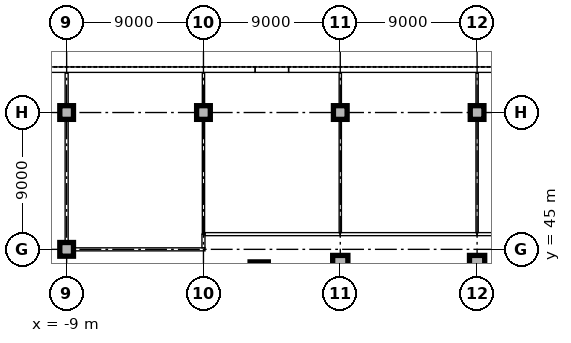
"""IFC4 building model, lengths in metres.
Left out: names, types, materials, properties, quantities, classifications, styles, units other than length and angle.
Written with IfcOpenShell. Run it as: python <this file> out.ifc"""

import sys

from ifc_helpers import new_model, si_unit, direction, frame, frame_2d, origin, origin_2d, place, context, subcontext, project, spatial, rectangle, extrude, element, fill, save


model = new_model("IFC4")
c1 = context("Model", 3, precision=1e-05, world=origin(), true_north=direction((0.0, 1.0)))
c2 = subcontext(c1, "Body", "Model", "MODEL_VIEW")
j1 = project(units=[si_unit("LENGTHUNIT", "METRE"), si_unit("PLANEANGLEUNIT", "RADIAN")], contexts=[c1])
p1 = place(None, origin())
s1 = spatial("IfcSite", under=j1, at=p1, CompositionType="ELEMENT")
p2 = place(p1, origin())
s2 = spatial("IfcBuilding", under=s1, at=p2, CompositionType="ELEMENT")
p3 = place(p2, origin())
s3 = spatial("IfcBuildingStorey", under=s2, at=p3, CompositionType="ELEMENT", Elevation=0.0)
p4 = place(p3, frame((3.667, 43.574, 0.0), z_axis=(0.0, 0.0, 1.0), x_axis=(1.0, 0.0, 0.0)))
e1 = element("IfcColumn", 1, at=p4, inside=s3, PredefinedType="COLUMN", context=c2, shape_type="SweptSolid", body=[
    extrude(rectangle(XDim=1.2, YDim=1.2, at=origin_2d()), origin(), (0.0, 0.0, 1.0), 5.7),
])
for number, where, z_axis, x_axis in (
    (2, (9.0, 44.1, 0.0), (0.0, 0.0, 1.0), (1.0, 0.0, 0.0)),
    (3, (18.0, 44.1, 0.0), (0.0, 0.0, 1.0), (1.0, 0.0, 0.0)),
):
    element("IfcColumn", number, at=place(p3, frame(where, z_axis=z_axis, x_axis=x_axis)), inside=s3, PredefinedType="COLUMN", context=c2, shape_type="SweptSolid", body=[
        extrude(rectangle(XDim=1.0, YDim=1.0, at=origin_2d()), origin(), (0.0, 0.0, 1.0), 5.7),
    ])
for number, where, z_axis, x_axis in (
    (4, (-9.0, 45.0, 0.0), (0.0, 0.0, 1.0), (1.0, 0.0, 0.0)),
    (5, (-9.0, 54.0, 0.0), (0.0, 0.0, 1.0), (1.0, 0.0, 0.0)),
    (6, (0.0, 54.0, 0.0), (0.0, 0.0, 1.0), (1.0, 0.0, 0.0)),
    (7, (9.0, 54.0, 0.0), (0.0, 0.0, 1.0), (1.0, 0.0, 0.0)),
    (8, (18.0, 54.0, 0.0), (0.0, 0.0, 1.0), (1.0, 0.0, 0.0)),
):
    element("IfcColumn", number, at=place(p3, frame(where, z_axis=z_axis, x_axis=x_axis)), inside=s3, PredefinedType="COLUMN", context=c2, shape_type="SweptSolid", body=[
        extrude(rectangle(XDim=0.9, YDim=0.9, at=origin_2d()), origin(), (0.0, 0.0, 1.0), 5.7),
    ])
p5 = place(p3, frame((63.0, 56.82, 0.0), z_axis=(0.0, 0.0, 1.0), x_axis=(-1.0, 0.0, 0.0)))
e9 = element("IfcWall", 9, at=p5, inside=s3, PredefinedType="STANDARD", context=c2, shape_type="SweptSolid", body=[
    extrude(rectangle(XDim=57.4, YDim=0.36, at=frame_2d((28.7, 0.0))), origin(), (0.0, 0.0, 1.0), 5.7),
])
p6 = place(p5, frame((32.55, 0.0, 0.0)))
e10 = element("IfcOpeningElement", 10, at=p6, cuts=e9, PredefinedType="OPENING", context=c2, shape_type="SweptSolid", body=[
    extrude(rectangle(XDim=2.4, YDim=2.4, at=frame_2d((1.2, 1.2))), frame((0.0, 0.19, 0.0), z_axis=(0.0, -1.0, 0.0), x_axis=(1.0, 0.0, 0.0)), (0.0, 0.0, 1.0), 0.38),
])
p7 = place(p5, frame((48.3, 0.0, 0.0)))
e11 = element("IfcOpeningElement", 11, at=p7, cuts=e9, PredefinedType="OPENING", context=c2, shape_type="SweptSolid", body=[
    extrude(rectangle(XDim=2.4, YDim=2.2, at=frame_2d((1.2, 1.1))), frame((0.0, 0.19, 0.0), z_axis=(0.0, -1.0, 0.0), x_axis=(1.0, 0.0, 0.0)), (0.0, 0.0, 1.0), 0.38),
])
p8 = place(p5, frame((39.3, 0.0, 0.0)))
e12 = element("IfcOpeningElement", 12, at=p8, cuts=e9, PredefinedType="OPENING", context=c2, shape_type="SweptSolid", body=[
    extrude(rectangle(XDim=2.4, YDim=2.2, at=frame_2d((1.2, 1.1))), frame((0.0, 0.19, 0.0), z_axis=(0.0, -1.0, 0.0), x_axis=(1.0, 0.0, 0.0)), (0.0, 0.0, 1.0), 0.38),
])
p9 = place(p5, frame((12.3, 0.0, 0.0)))
e13 = element("IfcOpeningElement", 13, at=p9, cuts=e9, PredefinedType="OPENING", context=c2, shape_type="SweptSolid", body=[
    extrude(rectangle(XDim=2.4, YDim=2.2, at=frame_2d((1.2, 1.1))), frame((0.0, 0.19, 0.0), z_axis=(0.0, -1.0, 0.0), x_axis=(1.0, 0.0, 0.0)), (0.0, 0.0, 1.0), 0.38),
])
p10 = place(p5, frame((21.6, 0.0, 0.0)))
e14 = element("IfcOpeningElement", 14, at=p10, cuts=e9, PredefinedType="OPENING", context=c2, shape_type="SweptSolid", body=[
    extrude(rectangle(XDim=1.8, YDim=2.2, at=frame_2d((0.9, 1.1))), frame((0.0, 0.19, 0.0), z_axis=(0.0, -1.0, 0.0), x_axis=(1.0, 0.0, 0.0)), (0.0, 0.0, 1.0), 0.38),
])
p11 = place(p5, frame((2.1, 0.0, 0.0)))
e15 = element("IfcOpeningElement", 15, at=p11, cuts=e9, PredefinedType="OPENING", context=c2, shape_type="SweptSolid", body=[
    extrude(rectangle(XDim=1.8, YDim=2.2, at=frame_2d((0.9, 1.1))), frame((0.0, 0.19, 0.0), z_axis=(0.0, -1.0, 0.0), x_axis=(1.0, 0.0, 0.0)), (0.0, 0.0, 1.0), 0.38),
])
p12 = place(p5, frame((7.35, 0.0, 0.6)))
e16 = element("IfcOpeningElement", 16, at=p12, cuts=e9, PredefinedType="OPENING", context=c2, shape_type="SweptSolid", body=[
    extrude(rectangle(XDim=3.3, YDim=3.0, at=frame_2d((1.65, 1.5))), frame((0.0, 0.19, 0.0), z_axis=(0.0, -1.0, 0.0), x_axis=(1.0, 0.0, 0.0)), (0.0, 0.0, 1.0), 0.38),
])
p13 = place(p5, frame((16.35, 0.0, 0.6)))
e17 = element("IfcOpeningElement", 17, at=p13, cuts=e9, PredefinedType="OPENING", context=c2, shape_type="SweptSolid", body=[
    extrude(rectangle(XDim=3.3, YDim=3.0, at=frame_2d((1.65, 1.5))), frame((0.0, 0.19, 0.0), z_axis=(0.0, -1.0, 0.0), x_axis=(1.0, 0.0, 0.0)), (0.0, 0.0, 1.0), 0.38),
])
p14 = place(p5, frame((25.35, 0.0, 0.6)))
e18 = element("IfcOpeningElement", 18, at=p14, cuts=e9, PredefinedType="OPENING", context=c2, shape_type="SweptSolid", body=[
    extrude(rectangle(XDim=3.3, YDim=3.0, at=frame_2d((1.65, 1.5))), frame((0.0, 0.19, 0.0), z_axis=(0.0, -1.0, 0.0), x_axis=(1.0, 0.0, 0.0)), (0.0, 0.0, 1.0), 0.38),
])
p15 = place(p5, frame((43.35, 0.0, 0.6)))
e19 = element("IfcOpeningElement", 19, at=p15, cuts=e9, PredefinedType="OPENING", context=c2, shape_type="SweptSolid", body=[
    extrude(rectangle(XDim=3.3, YDim=3.0, at=frame_2d((1.65, 1.5))), frame((0.0, 0.19, 0.0), z_axis=(0.0, -1.0, 0.0), x_axis=(1.0, 0.0, 0.0)), (0.0, 0.0, 1.0), 0.38),
])
p16 = place(p5, frame((52.35, 0.0, 0.6)))
e20 = element("IfcOpeningElement", 20, at=p16, cuts=e9, PredefinedType="OPENING", context=c2, shape_type="SweptSolid", body=[
    extrude(rectangle(XDim=3.3, YDim=3.0, at=frame_2d((1.65, 1.5))), frame((0.0, 0.19, 0.0), z_axis=(0.0, -1.0, 0.0), x_axis=(1.0, 0.0, 0.0)), (0.0, 0.0, 1.0), 0.38),
])
p17 = place(p3, frame((5.6, 56.82, 0.0), z_axis=(0.0, 0.0, 1.0), x_axis=(-1.0, 0.0, 0.0)))
e21 = element("IfcWall", 21, at=p17, inside=s3, PredefinedType="STANDARD", context=c2, shape_type="SweptSolid", body=[
    extrude(rectangle(XDim=2.2, YDim=0.36, at=frame_2d((1.1, 0.0))), origin(), (0.0, 0.0, 1.0), 5.7),
])
p18 = place(p17, frame((0.5, 0.0, 0.0)))
e22 = element("IfcOpeningElement", 22, at=p18, cuts=e21, PredefinedType="OPENING", context=c2, shape_type="SweptSolid", body=[
    extrude(rectangle(XDim=1.2, YDim=2.2, at=frame_2d((0.6, 1.1))), frame((0.0, 0.19, 0.0), z_axis=(0.0, -1.0, 0.0), x_axis=(1.0, 0.0, 0.0)), (0.0, 0.0, 1.0), 0.38),
])
p19 = place(p3, frame((3.4, 56.82, 0.0), z_axis=(0.0, 0.0, 1.0), x_axis=(-1.0, 0.0, 0.0)))
e23 = element("IfcWall", 23, at=p19, inside=s3, PredefinedType="STANDARD", context=c2, shape_type="SweptSolid", body=[
    extrude(rectangle(XDim=84.4, YDim=0.36, at=frame_2d((42.2, 0.0))), origin(), (0.0, 0.0, 1.0), 5.7),
])
p20 = place(p19, frame((15.7, 0.0, 0.0)))
e24 = element("IfcOpeningElement", 24, at=p20, cuts=e23, PredefinedType="OPENING", context=c2, shape_type="SweptSolid", body=[
    extrude(rectangle(XDim=2.4, YDim=2.4, at=frame_2d((1.2, 1.2))), frame((0.0, 0.19, 0.0), z_axis=(0.0, -1.0, 0.0), x_axis=(1.0, 0.0, 0.0)), (0.0, 0.0, 1.0), 0.38),
])
p21 = place(p19, frame((76.6, 0.0, 0.0)))
e25 = element("IfcOpeningElement", 25, at=p21, cuts=e23, PredefinedType="OPENING", context=c2, shape_type="SweptSolid", body=[
    extrude(rectangle(XDim=6.6, YDim=4.2, at=frame_2d((3.3, 2.1))), frame((0.0, 0.19, 0.0), z_axis=(0.0, -1.0, 0.0), x_axis=(1.0, 0.0, 0.0)), (0.0, 0.0, 1.0), 0.38),
])
p22 = place(p19, frame((59.65, 0.0, 0.0)))
e26 = element("IfcOpeningElement", 26, at=p22, cuts=e23, PredefinedType="OPENING", context=c2, shape_type="SweptSolid", body=[
    extrude(rectangle(XDim=4.5, YDim=4.2, at=frame_2d((2.25, 2.1))), frame((0.0, 0.19, 0.0), z_axis=(0.0, -1.0, 0.0), x_axis=(1.0, 0.0, 0.0)), (0.0, 0.0, 1.0), 0.38),
])
p23 = place(p19, frame((58.3, 0.0, 0.0)))
e27 = element("IfcOpeningElement", 27, at=p23, cuts=e23, PredefinedType="OPENING", context=c2, shape_type="SweptSolid", body=[
    extrude(rectangle(XDim=1.2, YDim=2.2, at=frame_2d((0.6, 1.1))), frame((0.0, 0.19, 0.0), z_axis=(0.0, -1.0, 0.0), x_axis=(1.0, 0.0, 0.0)), (0.0, 0.0, 1.0), 0.38),
])
p24 = place(p19, frame((70.0, 0.0, 0.0)))
e28 = element("IfcOpeningElement", 28, at=p24, cuts=e23, PredefinedType="OPENING", context=c2, shape_type="SweptSolid", body=[
    extrude(rectangle(XDim=1.8, YDim=2.2, at=frame_2d((0.9, 1.1))), frame((0.0, 0.19, 0.0), z_axis=(0.0, -1.0, 0.0), x_axis=(1.0, 0.0, 0.0)), (0.0, 0.0, 1.0), 0.38),
])
p25 = place(p19, frame((52.0, 0.0, 0.0)))
e29 = element("IfcOpeningElement", 29, at=p25, cuts=e23, PredefinedType="OPENING", context=c2, shape_type="SweptSolid", body=[
    extrude(rectangle(XDim=1.8, YDim=2.2, at=frame_2d((0.9, 1.1))), frame((0.0, 0.19, 0.0), z_axis=(0.0, -1.0, 0.0), x_axis=(1.0, 0.0, 0.0)), (0.0, 0.0, 1.0), 0.38),
])
p26 = place(p19, frame((1.75, 0.0, 0.6)))
e30 = element("IfcOpeningElement", 30, at=p26, cuts=e23, PredefinedType="OPENING", context=c2, shape_type="SweptSolid", body=[
    extrude(rectangle(XDim=3.3, YDim=3.0, at=frame_2d((1.65, 1.5))), frame((0.0, 0.19, 0.0), z_axis=(0.0, -1.0, 0.0), x_axis=(1.0, 0.0, 0.0)), (0.0, 0.0, 1.0), 0.38),
])
p27 = place(p19, frame((6.25, 0.0, 0.6)))
e31 = element("IfcOpeningElement", 31, at=p27, cuts=e23, PredefinedType="OPENING", context=c2, shape_type="SweptSolid", body=[
    extrude(rectangle(XDim=3.3, YDim=3.0, at=frame_2d((1.65, 1.5))), frame((0.0, 0.19, 0.0), z_axis=(0.0, -1.0, 0.0), x_axis=(1.0, 0.0, 0.0)), (0.0, 0.0, 1.0), 0.38),
])
p28 = place(p19, frame((10.75, 0.0, 0.6)))
e32 = element("IfcOpeningElement", 32, at=p28, cuts=e23, PredefinedType="OPENING", context=c2, shape_type="SweptSolid", body=[
    extrude(rectangle(XDim=3.3, YDim=3.0, at=frame_2d((1.65, 1.5))), frame((0.0, 0.19, 0.0), z_axis=(0.0, -1.0, 0.0), x_axis=(1.0, 0.0, 0.0)), (0.0, 0.0, 1.0), 0.38),
])
p29 = place(p19, frame((19.75, 0.0, 0.6)))
e33 = element("IfcOpeningElement", 33, at=p29, cuts=e23, PredefinedType="OPENING", context=c2, shape_type="SweptSolid", body=[
    extrude(rectangle(XDim=3.3, YDim=3.0, at=frame_2d((1.65, 1.5))), frame((0.0, 0.19, 0.0), z_axis=(0.0, -1.0, 0.0), x_axis=(1.0, 0.0, 0.0)), (0.0, 0.0, 1.0), 0.38),
])
p30 = place(p19, frame((24.25, 0.0, 0.6)))
e34 = element("IfcOpeningElement", 34, at=p30, cuts=e23, PredefinedType="OPENING", context=c2, shape_type="SweptSolid", body=[
    extrude(rectangle(XDim=3.3, YDim=3.0, at=frame_2d((1.65, 1.5))), frame((0.0, 0.19, 0.0), z_axis=(0.0, -1.0, 0.0), x_axis=(1.0, 0.0, 0.0)), (0.0, 0.0, 1.0), 0.38),
])
p31 = place(p19, frame((28.75, 0.0, 0.6)))
e35 = element("IfcOpeningElement", 35, at=p31, cuts=e23, PredefinedType="OPENING", context=c2, shape_type="SweptSolid", body=[
    extrude(rectangle(XDim=3.3, YDim=3.0, at=frame_2d((1.65, 1.5))), frame((0.0, 0.19, 0.0), z_axis=(0.0, -1.0, 0.0), x_axis=(1.0, 0.0, 0.0)), (0.0, 0.0, 1.0), 0.38),
])
p32 = place(p19, frame((33.25, 0.0, 0.6)))
e36 = element("IfcOpeningElement", 36, at=p32, cuts=e23, PredefinedType="OPENING", context=c2, shape_type="SweptSolid", body=[
    extrude(rectangle(XDim=3.3, YDim=3.0, at=frame_2d((1.65, 1.5))), frame((0.0, 0.19, 0.0), z_axis=(0.0, -1.0, 0.0), x_axis=(1.0, 0.0, 0.0)), (0.0, 0.0, 1.0), 0.38),
])
p33 = place(p19, frame((37.75, 0.0, 0.6)))
e37 = element("IfcOpeningElement", 37, at=p33, cuts=e23, PredefinedType="OPENING", context=c2, shape_type="SweptSolid", body=[
    extrude(rectangle(XDim=3.3, YDim=3.0, at=frame_2d((1.65, 1.5))), frame((0.0, 0.19, 0.0), z_axis=(0.0, -1.0, 0.0), x_axis=(1.0, 0.0, 0.0)), (0.0, 0.0, 1.0), 0.38),
])
p34 = place(p19, frame((42.25, 0.0, 0.6)))
e38 = element("IfcOpeningElement", 38, at=p34, cuts=e23, PredefinedType="OPENING", context=c2, shape_type="SweptSolid", body=[
    extrude(rectangle(XDim=3.3, YDim=3.0, at=frame_2d((1.65, 1.5))), frame((0.0, 0.19, 0.0), z_axis=(0.0, -1.0, 0.0), x_axis=(1.0, 0.0, 0.0)), (0.0, 0.0, 1.0), 0.38),
])
p35 = place(p19, frame((46.75, 0.0, 0.6)))
e39 = element("IfcOpeningElement", 39, at=p35, cuts=e23, PredefinedType="OPENING", context=c2, shape_type="SweptSolid", body=[
    extrude(rectangle(XDim=3.3, YDim=3.0, at=frame_2d((1.65, 1.5))), frame((0.0, 0.19, 0.0), z_axis=(0.0, -1.0, 0.0), x_axis=(1.0, 0.0, 0.0)), (0.0, 0.0, 1.0), 0.38),
])
p36 = place(p3, frame((-9.0, 45.47, 0.0), z_axis=(0.0, 0.0, 1.0), x_axis=(0.0, 1.0, 0.0)))
e40 = element("IfcWall", 40, at=p36, inside=s3, PredefinedType="PARTITIONING", context=c2, shape_type="SweptSolid", body=[
    extrude(rectangle(XDim=8.06, YDim=0.2, at=frame_2d((4.03, 0.0))), origin(), (0.0, 0.0, 1.0), 5.7),
])
p37 = place(p3, frame((-9.0, 54.47, 0.0), z_axis=(0.0, 0.0, 1.0), x_axis=(0.0, 1.0, 0.0)))
e41 = element("IfcWall", 41, at=p37, inside=s3, PredefinedType="PARTITIONING", context=c2, shape_type="SweptSolid", body=[
    extrude(rectangle(XDim=2.13, YDim=0.2, at=frame_2d((1.065, 0.0))), origin(), (0.0, 0.0, 1.0), 5.7),
])
p38 = place(p37, frame((0.53, 0.0, 0.0)))
e42 = element("IfcOpeningElement", 42, at=p38, cuts=e41, PredefinedType="OPENING", context=c2, shape_type="SweptSolid", body=[
    extrude(rectangle(XDim=1.0, YDim=2.1, at=frame_2d((0.5, 1.05))), frame((0.0, 0.11, 0.0), z_axis=(0.0, -1.0, 0.0), x_axis=(1.0, 0.0, 0.0)), (0.0, 0.0, 1.0), 0.22),
])
p39 = place(p3, frame((-8.53, 45.0, 0.0), z_axis=(0.0, 0.0, 1.0), x_axis=(1.0, 0.0, 0.0)))
e43 = element("IfcWall", 43, at=p39, inside=s3, PredefinedType="PARTITIONING", context=c2, shape_type="SweptSolid", body=[
    extrude(rectangle(XDim=8.63, YDim=0.2, at=frame_2d((4.315, 0.0))), origin(), (0.0, 0.0, 1.0), 5.7),
])
p40 = place(p3, frame((0.0, 45.1, 0.0), z_axis=(0.0, 0.0, 1.0), x_axis=(0.0, 1.0, 0.0)))
e44 = element("IfcWall", 44, at=p40, inside=s3, PredefinedType="PARTITIONING", context=c2, shape_type="SweptSolid", body=[
    extrude(rectangle(XDim=0.9, YDim=0.2, at=frame_2d((0.45, 0.0))), origin(), (0.0, 0.0, 1.0), 5.7),
])
p41 = place(p3, frame((0.0, 46.0, 0.0), z_axis=(0.0, 0.0, 1.0), x_axis=(0.0, 1.0, 0.0)))
e45 = element("IfcWall", 45, at=p41, inside=s3, PredefinedType="PARTITIONING", context=c2, shape_type="SweptSolid", body=[
    extrude(rectangle(XDim=7.53, YDim=0.15, at=frame_2d((3.765, 0.0))), origin(), (0.0, 0.0, 1.0), 5.7),
])
p42 = place(p3, frame((0.0, 54.47, 0.0), z_axis=(0.0, 0.0, 1.0), x_axis=(0.0, 1.0, 0.0)))
e46 = element("IfcWall", 46, at=p42, inside=s3, PredefinedType="PARTITIONING", context=c2, shape_type="SweptSolid", body=[
    extrude(rectangle(XDim=2.13, YDim=0.15, at=frame_2d((1.065, 0.0))), origin(), (0.0, 0.0, 1.0), 5.7),
])
p43 = place(p3, frame((0.1, 46.0, 0.0), z_axis=(0.0, 0.0, 1.0), x_axis=(1.0, 0.0, 0.0)))
e47 = element("IfcWall", 47, at=p43, inside=s3, PredefinedType="PARTITIONING", context=c2, shape_type="SweptSolid", body=[
    extrude(rectangle(XDim=8.9, YDim=0.2, at=frame_2d((4.45, 0.0))), origin(), (0.0, 0.0, 1.0), 5.7),
])
p44 = place(p43, frame((3.9, 0.0, 0.0)))
e48 = element("IfcOpeningElement", 48, at=p44, cuts=e47, PredefinedType="OPENING", context=c2, shape_type="SweptSolid", body=[
    extrude(rectangle(XDim=1.0, YDim=2.1, at=frame_2d((0.5, 1.05))), frame((0.0, 0.11, 0.0), z_axis=(0.0, -1.0, 0.0), x_axis=(1.0, 0.0, 0.0)), (0.0, 0.0, 1.0), 0.22),
])
p45 = place(p3, frame((9.0, 46.0, 0.0), z_axis=(0.0, 0.0, 1.0), x_axis=(1.0, 0.0, 0.0)))
e49 = element("IfcWall", 49, at=p45, inside=s3, PredefinedType="PARTITIONING", context=c2, shape_type="SweptSolid", body=[
    extrude(rectangle(XDim=9.0, YDim=0.2, at=frame_2d((4.5, 0.0))), origin(), (0.0, 0.0, 1.0), 5.7),
])
p46 = place(p45, frame((4.0, 0.0, 0.0)))
e50 = element("IfcOpeningElement", 50, at=p46, cuts=e49, PredefinedType="OPENING", context=c2, shape_type="SweptSolid", body=[
    extrude(rectangle(XDim=1.0, YDim=2.1, at=frame_2d((0.5, 1.05))), frame((0.0, 0.11, 0.0), z_axis=(0.0, -1.0, 0.0), x_axis=(1.0, 0.0, 0.0)), (0.0, 0.0, 1.0), 0.22),
])
p47 = place(p3, frame((18.0, 46.0, 0.0), z_axis=(0.0, 0.0, 1.0), x_axis=(1.0, 0.0, 0.0)))
e51 = element("IfcWall", 51, at=p47, inside=s3, PredefinedType="PARTITIONING", context=c2, shape_type="SweptSolid", body=[
    extrude(rectangle(XDim=9.0, YDim=0.2, at=frame_2d((4.5, 0.0))), origin(), (0.0, 0.0, 1.0), 5.7),
])
p48 = place(p47, frame((7.7, 0.0, 0.0)))
e52 = element("IfcOpeningElement", 52, at=p48, cuts=e51, PredefinedType="OPENING", context=c2, shape_type="SweptSolid", body=[
    extrude(rectangle(XDim=1.0, YDim=2.1, at=frame_2d((0.5, 1.05))), frame((0.0, 0.11, 0.0), z_axis=(0.0, -1.0, 0.0), x_axis=(1.0, 0.0, 0.0)), (0.0, 0.0, 1.0), 0.22),
])
p49 = place(p3, frame((9.0, 46.1, 0.0), z_axis=(0.0, 0.0, 1.0), x_axis=(0.0, 1.0, 0.0)))
e53 = element("IfcWall", 53, at=p49, inside=s3, PredefinedType="PARTITIONING", context=c2, shape_type="SweptSolid", body=[
    extrude(rectangle(XDim=7.43, YDim=0.15, at=frame_2d((3.715, 0.0))), origin(), (0.0, 0.0, 1.0), 5.7),
])
p50 = place(p3, frame((9.0, 54.47, 0.0), z_axis=(0.0, 0.0, 1.0), x_axis=(0.0, 1.0, 0.0)))
e54 = element("IfcWall", 54, at=p50, inside=s3, PredefinedType="PARTITIONING", context=c2, shape_type="SweptSolid", body=[
    extrude(rectangle(XDim=2.13, YDim=0.15, at=frame_2d((1.065, 0.0))), origin(), (0.0, 0.0, 1.0), 5.7),
])
p51 = place(p3, frame((18.0, 46.1, 0.0), z_axis=(0.0, 0.0, 1.0), x_axis=(0.0, 1.0, 0.0)))
e55 = element("IfcWall", 55, at=p51, inside=s3, PredefinedType="PARTITIONING", context=c2, shape_type="SweptSolid", body=[
    extrude(rectangle(XDim=7.43, YDim=0.15, at=frame_2d((3.715, 0.0))), origin(), (0.0, 0.0, 1.0), 5.7),
])
p52 = place(p3, frame((18.0, 54.47, 0.0), z_axis=(0.0, 0.0, 1.0), x_axis=(0.0, 1.0, 0.0)))
e56 = element("IfcWall", 56, at=p52, inside=s3, PredefinedType="PARTITIONING", context=c2, shape_type="SweptSolid", body=[
    extrude(rectangle(XDim=2.13, YDim=0.15, at=frame_2d((1.065, 0.0))), origin(), (0.0, 0.0, 1.0), 5.7),
])
p53 = place(p7, frame((2.4, 0.0, 0.0), z_axis=(0.0, 0.0, 1.0), x_axis=(-1.0, 0.0, 0.0)))
e57 = element("IfcDoor", 57, at=p53, inside=s3, OperationType="DOUBLE_DOOR_SINGLE_SWING", PredefinedType="DOOR", context=c2, shape_type="SweptSolid", body=[
    extrude(rectangle(XDim=2.4, YDim=2.2, at=frame_2d((1.2, 1.1))), frame((0.0, -0.07, 0.0), z_axis=(0.0, -1.0, 0.0), x_axis=(1.0, 0.0, 0.0)), (0.0, 0.0, 1.0), 0.05),
])
fill(e11, e57)
p54 = place(p15, origin())
e58 = element("IfcWindow", 58, at=p54, inside=s3, PartitioningType="SINGLE_PANEL", PredefinedType="WINDOW", context=c2, shape_type="SweptSolid", body=[
    extrude(rectangle(XDim=3.3, YDim=3.0, at=frame_2d((1.65, 1.5))), frame((0.0, 0.13, 0.0), z_axis=(0.0, -1.0, 0.0), x_axis=(1.0, 0.0, 0.0)), (0.0, 0.0, 1.0), 0.06),
])
fill(e19, e58)
p55 = place(p16, origin())
e59 = element("IfcWindow", 59, at=p55, inside=s3, PartitioningType="SINGLE_PANEL", PredefinedType="WINDOW", context=c2, shape_type="SweptSolid", body=[
    extrude(rectangle(XDim=3.3, YDim=3.0, at=frame_2d((1.65, 1.5))), frame((0.0, 0.13, 0.0), z_axis=(0.0, -1.0, 0.0), x_axis=(1.0, 0.0, 0.0)), (0.0, 0.0, 1.0), 0.06),
])
fill(e20, e59)
p56 = place(p18, frame((1.2, 0.0, 0.0), z_axis=(0.0, 0.0, 1.0), x_axis=(-1.0, 0.0, 0.0)))
e60 = element("IfcDoor", 60, at=p56, inside=s3, OperationType="SINGLE_SWING_LEFT", PredefinedType="DOOR", context=c2, shape_type="SweptSolid", body=[
    extrude(rectangle(XDim=1.2, YDim=2.2, at=frame_2d((0.6, 1.1))), frame((0.0, -0.07, 0.0), z_axis=(0.0, -1.0, 0.0), x_axis=(1.0, 0.0, 0.0)), (0.0, 0.0, 1.0), 0.05),
])
fill(e22, e60)
p57 = place(p26, origin())
e61 = element("IfcWindow", 61, at=p57, inside=s3, PartitioningType="SINGLE_PANEL", PredefinedType="WINDOW", context=c2, shape_type="SweptSolid", body=[
    extrude(rectangle(XDim=3.3, YDim=3.0, at=frame_2d((1.65, 1.5))), frame((0.0, 0.13, 0.0), z_axis=(0.0, -1.0, 0.0), x_axis=(1.0, 0.0, 0.0)), (0.0, 0.0, 1.0), 0.06),
])
fill(e30, e61)
p58 = place(p27, origin())
e62 = element("IfcWindow", 62, at=p58, inside=s3, PartitioningType="SINGLE_PANEL", PredefinedType="WINDOW", context=c2, shape_type="SweptSolid", body=[
    extrude(rectangle(XDim=3.3, YDim=3.0, at=frame_2d((1.65, 1.5))), frame((0.0, 0.13, 0.0), z_axis=(0.0, -1.0, 0.0), x_axis=(1.0, 0.0, 0.0)), (0.0, 0.0, 1.0), 0.06),
])
fill(e31, e62)
p59 = place(p28, origin())
e63 = element("IfcWindow", 63, at=p59, inside=s3, PartitioningType="SINGLE_PANEL", PredefinedType="WINDOW", context=c2, shape_type="SweptSolid", body=[
    extrude(rectangle(XDim=3.3, YDim=3.0, at=frame_2d((1.65, 1.5))), frame((0.0, 0.13, 0.0), z_axis=(0.0, -1.0, 0.0), x_axis=(1.0, 0.0, 0.0)), (0.0, 0.0, 1.0), 0.06),
])
fill(e32, e63)
p60 = place(p44, origin())
e64 = element("IfcDoor", 64, at=p60, inside=s3, OperationType="SINGLE_SWING_RIGHT", PredefinedType="DOOR", context=c2, shape_type="SweptSolid", body=[
    extrude(rectangle(XDim=1.0, YDim=2.1, at=frame_2d((0.5, 1.05))), frame((0.0, 0.025, 0.0), z_axis=(0.0, -1.0, 0.0), x_axis=(1.0, 0.0, 0.0)), (0.0, 0.0, 1.0), 0.05),
])
fill(e48, e64)
p61 = place(p38, frame((1.0, 0.0, 0.0), z_axis=(0.0, 0.0, 1.0), x_axis=(-1.0, 0.0, 0.0)))
e65 = element("IfcDoor", 65, at=p61, inside=s3, OperationType="SINGLE_SWING_RIGHT", PredefinedType="DOOR", context=c2, shape_type="SweptSolid", body=[
    extrude(rectangle(XDim=1.0, YDim=2.1, at=frame_2d((0.5, 1.05))), frame((0.0, 0.025, 0.0), z_axis=(0.0, -1.0, 0.0), x_axis=(1.0, 0.0, 0.0)), (0.0, 0.0, 1.0), 0.05),
])
fill(e42, e65)
p62 = place(p46, origin())
e66 = element("IfcDoor", 66, at=p62, inside=s3, OperationType="SINGLE_SWING_LEFT", PredefinedType="DOOR", context=c2, shape_type="SweptSolid", body=[
    extrude(rectangle(XDim=1.0, YDim=2.1, at=frame_2d((0.5, 1.05))), frame((0.0, 0.025, 0.0), z_axis=(0.0, -1.0, 0.0), x_axis=(1.0, 0.0, 0.0)), (0.0, 0.0, 1.0), 0.05),
])
fill(e50, e66)
save(model, sys.argv[1])
